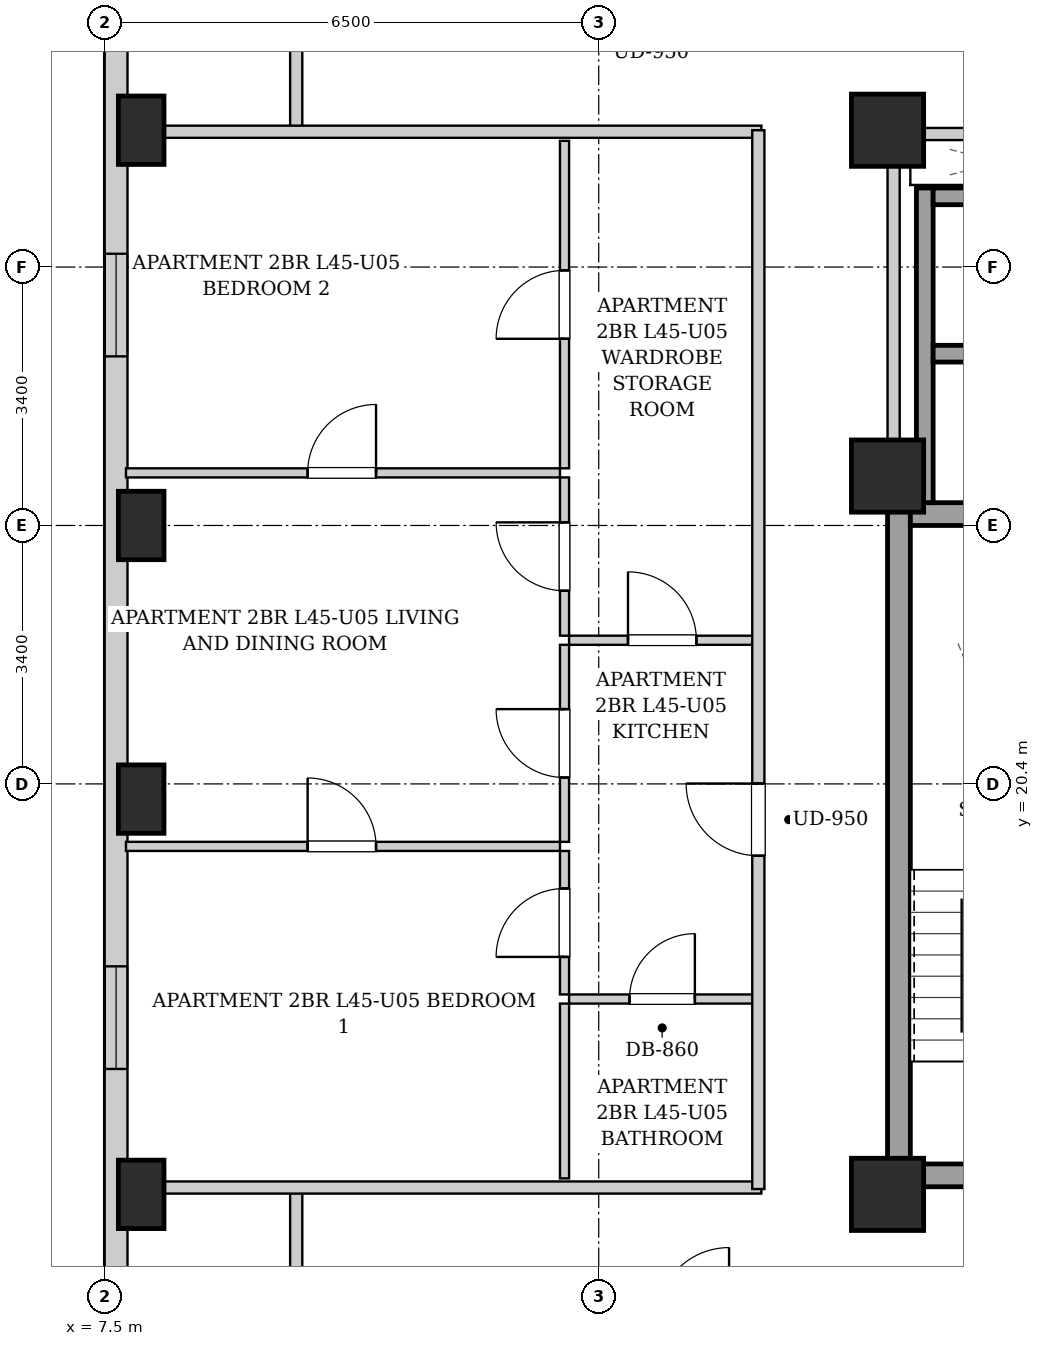
"""IFC4 building model, lengths in metres.
Left out: names, types, materials, properties, quantities, classifications, styles, units other than length and angle.
Written with IfcOpenShell. Run it as: python <this file> out.ifc"""

import sys

from ifc_helpers import new_model, si_unit, direction, frame, frame_2d, origin, origin_2d, place, context, subcontext, project, spatial, rectangle, extrude, element, fill, save


model = new_model("IFC4")
c1 = context("Model", 3, precision=1e-05, world=origin(), true_north=direction((0.0, 1.0)))
c2 = subcontext(c1, "Body", "Model", "MODEL_VIEW")
j1 = project(units=[si_unit("LENGTHUNIT", "METRE"), si_unit("PLANEANGLEUNIT", "RADIAN")], contexts=[c1])
p1 = place(None, origin())
s1 = spatial("IfcSite", under=j1, at=p1, CompositionType="ELEMENT")
p2 = place(p1, origin())
s2 = spatial("IfcBuilding", under=s1, at=p2, CompositionType="ELEMENT")
p3 = place(p2, frame((0.0, 0.0, 156.9)))
s3 = spatial("IfcBuildingStorey", under=s2, at=p3, CompositionType="ELEMENT", Elevation=156.9)
for number, where, z_axis, x_axis in (
    (1, (7.98, 15.0, 0.0), (0.0, 0.0, 1.0), (1.0, 0.0, 0.0)),
    (2, (7.98, 20.2, 0.0), (0.0, 0.0, 1.0), (1.0, 0.0, 0.0)),
    (3, (7.98, 23.8, 0.0), (0.0, 0.0, 1.0), (1.0, 0.0, 0.0)),
    (4, (7.98, 29.0, 0.0), (0.0, 0.0, 1.0), (1.0, 0.0, 0.0)),
):
    element("IfcColumn", number, at=place(p3, frame(where, z_axis=z_axis, x_axis=x_axis)), inside=s3, PredefinedType="COLUMN", context=c2, shape_type="SweptSolid", body=[
        extrude(rectangle(XDim=0.6, YDim=0.9, at=origin_2d()), origin(), (0.0, 0.0, 1.0), 3.25),
    ])
for number, where, z_axis, x_axis in (
    (5, (17.8, 15.0, 0.0), (0.0, 0.0, 1.0), (1.0, 0.0, 0.0)),
    (6, (17.8, 29.0, 0.0), (0.0, 0.0, 1.0), (1.0, 0.0, 0.0)),
    (7, (17.8, 24.45, 0.0), (0.0, 0.0, 1.0), (1.0, 0.0, 0.0)),
):
    element("IfcColumn", number, at=place(p3, frame(where, z_axis=z_axis, x_axis=x_axis)), inside=s3, PredefinedType="COLUMN", context=c2, shape_type="SweptSolid", body=[
        extrude(rectangle(XDim=0.95, YDim=0.95, at=origin_2d()), origin(), (0.0, 0.0, 1.0), 3.25),
    ])
p4 = place(p3, frame((7.65, 6.3, 0.0), z_axis=(0.0, 0.0, 1.0), x_axis=(0.0, 1.0, 0.0)))
e8 = element("IfcWall", 8, at=p4, inside=s3, PredefinedType="SOLIDWALL", context=c2, shape_type="SweptSolid", body=[
    extrude(rectangle(XDim=34.5, YDim=0.3, at=frame_2d((17.25, 0.0))), origin(), (0.0, 0.0, 1.0), 2.99),
])
p5 = place(p4, frame((30.075, 0.0, 0.55)))
e9 = element("IfcOpeningElement", 9, at=p5, cuts=e8, PredefinedType="OPENING", context=c2, shape_type="SweptSolid", body=[
    extrude(rectangle(XDim=1.35, YDim=1.2, at=frame_2d((0.675, 0.6))), frame((0.0, 0.16, 0.0), z_axis=(0.0, -1.0, 0.0), x_axis=(1.0, 0.0, 0.0)), (0.0, 0.0, 1.0), 0.32),
])
p6 = place(p4, frame((28.31, 0.0, 0.55)))
e10 = element("IfcOpeningElement", 10, at=p6, cuts=e8, PredefinedType="OPENING", context=c2, shape_type="SweptSolid", body=[
    extrude(rectangle(XDim=1.35, YDim=1.2, at=frame_2d((0.675, 0.6))), frame((0.0, 0.16, 0.0), z_axis=(0.0, -1.0, 0.0), x_axis=(1.0, 0.0, 0.0)), (0.0, 0.0, 1.0), 0.32),
])
p7 = place(p4, frame((10.35, 0.0, 0.55)))
e11 = element("IfcOpeningElement", 11, at=p7, cuts=e8, PredefinedType="OPENING", context=c2, shape_type="SweptSolid", body=[
    extrude(rectangle(XDim=1.35, YDim=1.2, at=frame_2d((0.675, 0.6))), frame((0.0, 0.16, 0.0), z_axis=(0.0, -1.0, 0.0), x_axis=(1.0, 0.0, 0.0)), (0.0, 0.0, 1.0), 0.32),
])
p8 = place(p4, frame((19.725, 0.0, 0.55)))
e12 = element("IfcOpeningElement", 12, at=p8, cuts=e8, PredefinedType="OPENING", context=c2, shape_type="SweptSolid", body=[
    extrude(rectangle(XDim=1.35, YDim=1.2, at=frame_2d((0.675, 0.6))), frame((0.0, 0.16, 0.0), z_axis=(0.0, -1.0, 0.0), x_axis=(1.0, 0.0, 0.0)), (0.0, 0.0, 1.0), 0.32),
])
p9 = place(p3, frame((17.95, 15.1, 0.0), z_axis=(0.0, 0.0, 1.0), x_axis=(0.0, 1.0, 0.0)))
e13 = element("IfcWall", 13, at=p9, inside=s3, PredefinedType="SHEAR", context=c2, shape_type="SweptSolid", body=[
    extrude(rectangle(XDim=9.0, YDim=0.3, at=frame_2d((4.5, 0.0))), origin(), (0.0, 0.0, 1.0), 2.99),
])
p10 = place(p3, frame((18.1, 23.95, 0.0), z_axis=(0.0, 0.0, 1.0), x_axis=(1.0, 0.0, 0.0)))
e14 = element("IfcWall", 14, at=p10, inside=s3, PredefinedType="SHEAR", context=c2, shape_type="SweptSolid", body=[
    extrude(rectangle(XDim=2.85, YDim=0.3, at=frame_2d((1.425, 0.0))), origin(), (0.0, 0.0, 1.0), 2.99),
])
p11 = place(p3, frame((18.1, 15.25, 0.0), z_axis=(0.0, 0.0, 1.0), x_axis=(1.0, 0.0, 0.0)))
e15 = element("IfcWall", 15, at=p11, inside=s3, PredefinedType="SHEAR", context=c2, shape_type="SweptSolid", body=[
    extrude(rectangle(XDim=2.85, YDim=0.3, at=frame_2d((1.425, 0.0))), origin(), (0.0, 0.0, 1.0), 2.99),
])
p12 = place(p11, frame((0.86, 0.0, 0.0)))
e16 = element("IfcOpeningElement", 16, at=p12, cuts=e15, PredefinedType="OPENING", context=c2, shape_type="SweptSolid", body=[
    extrude(rectangle(XDim=1.1, YDim=2.05, at=frame_2d((0.55, 1.025))), frame((0.0, 0.16, 0.0), z_axis=(0.0, -1.0, 0.0), x_axis=(1.0, 0.0, 0.0)), (0.0, 0.0, 1.0), 0.32),
])
p13 = place(p3, frame((18.29, 24.1, 0.0), z_axis=(0.0, 0.0, 1.0), x_axis=(0.0, 1.0, 0.0)))
e17 = element("IfcWall", 17, at=p13, inside=s3, PredefinedType="SHEAR", context=c2, shape_type="SweptSolid", body=[
    extrude(rectangle(XDim=4.14, YDim=0.22, at=frame_2d((2.07, 0.0))), origin(), (0.0, 0.0, 1.0), 2.99),
])
for number, where, z_axis, x_axis in (
    (18, (18.4, 26.06, 0.0), (0.0, 0.0, 1.0), (1.0, 0.0, 0.0)),
    (19, (18.4, 28.13, 0.0), (0.0, 0.0, 1.0), (1.0, 0.0, 0.0)),
):
    element("IfcWall", number, at=place(p3, frame(where, z_axis=z_axis, x_axis=x_axis)), inside=s3, PredefinedType="SHEAR", context=c2, shape_type="SweptSolid", body=[
        extrude(rectangle(XDim=1.9, YDim=0.22, at=frame_2d((0.95, 0.0))), origin(), (0.0, 0.0, 1.0), 2.99),
    ])
p14 = place(p3, frame((17.88, 24.12, 0.0), z_axis=(0.0, 0.0, 1.0), x_axis=(0.0, 1.0, 0.0)))
e20 = element("IfcWall", 20, at=p14, inside=s3, PredefinedType="PARTITIONING", context=c2, shape_type="SweptSolid", body=[
    extrude(rectangle(XDim=4.76, YDim=0.16, at=frame_2d((2.38, 0.0))), origin(), (0.0, 0.0, 1.0), 2.325),
])
p15 = place(p3, frame((17.96, 28.95, 0.0), z_axis=(0.0, 0.0, 1.0), x_axis=(1.0, 0.0, 0.0)))
e21 = element("IfcWall", 21, at=p15, inside=s3, PredefinedType="PARTITIONING", context=c2, shape_type="SweptSolid", body=[
    extrude(rectangle(XDim=4.29, YDim=0.16, at=frame_2d((2.145, 0.0))), origin(), (0.0, 0.0, 1.0), 2.442),
])
p16 = place(p15, frame((1.695, 0.0, 0.0)))
e22 = element("IfcOpeningElement", 22, at=p16, cuts=e21, PredefinedType="OPENING", context=c2, shape_type="SweptSolid", body=[
    extrude(rectangle(XDim=0.86, YDim=2.05, at=frame_2d((0.43, 1.025))), frame((0.0, 0.09, 0.0), z_axis=(0.0, -1.0, 0.0), x_axis=(1.0, 0.0, 0.0)), (0.0, 0.0, 1.0), 0.18),
])
for number, where, z_axis, x_axis in (
    (23, (10.02, 13.35, 0.0), (0.0, 0.0, 1.0), (0.0, 1.0, 0.0)),
    (24, (10.02, 28.98, 0.0), (0.0, 0.0, 1.0), (0.0, 1.0, 0.0)),
):
    element("IfcWall", number, at=place(p3, frame(where, z_axis=z_axis, x_axis=x_axis)), inside=s3, PredefinedType="PARTITIONING", context=c2, shape_type="SweptSolid", body=[
        extrude(rectangle(XDim=1.74, YDim=0.16, at=frame_2d((0.87, 0.0))), origin(), (0.0, 0.0, 1.0), 2.99),
    ])
for number, where, z_axis, x_axis in (
    (25, (7.78, 15.09, 0.0), (0.0, 0.0, 1.0), (1.0, 0.0, 0.0)),
    (26, (7.78, 28.98, 0.0), (0.0, 0.0, 1.0), (1.0, 0.0, 0.0)),
):
    element("IfcWall", number, at=place(p3, frame(where, z_axis=z_axis, x_axis=x_axis)), inside=s3, PredefinedType="PARTITIONING", context=c2, shape_type="SweptSolid", body=[
        extrude(rectangle(XDim=8.36, YDim=0.16, at=frame_2d((4.18, 0.0))), origin(), (0.0, 0.0, 1.0), 2.442),
    ])
p17 = place(p3, frame((13.61, 22.29, 0.0), z_axis=(0.0, 0.0, 1.0), x_axis=(1.0, 0.0, 0.0)))
e27 = element("IfcWall", 27, at=p17, inside=s3, PredefinedType="PARTITIONING", context=c2, shape_type="SweptSolid", body=[
    extrude(rectangle(XDim=2.45, YDim=0.12, at=frame_2d((1.225, 0.0))), origin(), (0.0, 0.0, 1.0), 2.99),
])
p18 = place(p17, frame((0.775, 0.0, 0.0)))
e28 = element("IfcOpeningElement", 28, at=p18, cuts=e27, PredefinedType="OPENING", context=c2, shape_type="SweptSolid", body=[
    extrude(rectangle(XDim=0.9, YDim=2.05, at=frame_2d((0.45, 1.025))), frame((0.0, 0.07, 0.0), z_axis=(0.0, -1.0, 0.0), x_axis=(1.0, 0.0, 0.0)), (0.0, 0.0, 1.0), 0.14),
])
p19 = place(p3, frame((13.55, 22.35, 0.0), z_axis=(0.0, 0.0, 1.0), x_axis=(0.0, 1.0, 0.0)))
e29 = element("IfcWall", 29, at=p19, inside=s3, PredefinedType="PARTITIONING", context=c2, shape_type="SweptSolid", body=[
    extrude(rectangle(XDim=2.082, YDim=0.12, at=frame_2d((1.041, 0.0))), origin(), (0.0, 0.0, 1.0), 2.99),
])
p20 = place(p19, frame((0.591, 0.0, 0.0)))
e30 = element("IfcOpeningElement", 30, at=p20, cuts=e29, PredefinedType="OPENING", context=c2, shape_type="SweptSolid", body=[
    extrude(rectangle(XDim=0.9, YDim=2.05, at=frame_2d((0.45, 1.025))), frame((0.0, 0.07, 0.0), z_axis=(0.0, -1.0, 0.0), x_axis=(1.0, 0.0, 0.0)), (0.0, 0.0, 1.0), 0.14),
])
p21 = place(p3, frame((13.55, 24.552, 0.0), z_axis=(0.0, 0.0, 1.0), x_axis=(0.0, 1.0, 0.0)))
e31 = element("IfcWall", 31, at=p21, inside=s3, PredefinedType="PARTITIONING", context=c2, shape_type="SweptSolid", body=[
    extrude(rectangle(XDim=4.308, YDim=0.12, at=frame_2d((2.154, 0.0))), origin(), (0.0, 0.0, 1.0), 2.99),
])
p22 = place(p21, frame((1.704, 0.0, 0.0)))
e32 = element("IfcOpeningElement", 32, at=p22, cuts=e31, PredefinedType="OPENING", context=c2, shape_type="SweptSolid", body=[
    extrude(rectangle(XDim=0.9, YDim=2.05, at=frame_2d((0.45, 1.025))), frame((0.0, 0.07, 0.0), z_axis=(0.0, -1.0, 0.0), x_axis=(1.0, 0.0, 0.0)), (0.0, 0.0, 1.0), 0.14),
])
p23 = place(p3, frame((13.61, 17.57, 0.0), z_axis=(0.0, 0.0, 1.0), x_axis=(1.0, 0.0, 0.0)))
e33 = element("IfcWall", 33, at=p23, inside=s3, PredefinedType="PARTITIONING", context=c2, shape_type="SweptSolid", body=[
    extrude(rectangle(XDim=2.45, YDim=0.12, at=frame_2d((1.225, 0.0))), origin(), (0.0, 0.0, 1.0), 2.99),
])
p24 = place(p23, frame((0.795, 0.0, 0.0)))
e34 = element("IfcOpeningElement", 34, at=p24, cuts=e33, PredefinedType="OPENING", context=c2, shape_type="SweptSolid", body=[
    extrude(rectangle(XDim=0.86, YDim=2.05, at=frame_2d((0.43, 1.025))), frame((0.0, 0.07, 0.0), z_axis=(0.0, -1.0, 0.0), x_axis=(1.0, 0.0, 0.0)), (0.0, 0.0, 1.0), 0.14),
])
p25 = place(p3, frame((13.55, 15.21, 0.0), z_axis=(0.0, 0.0, 1.0), x_axis=(0.0, 1.0, 0.0)))
e35 = element("IfcWall", 35, at=p25, inside=s3, PredefinedType="PARTITIONING", context=c2, shape_type="SweptSolid", body=[
    extrude(rectangle(XDim=2.3, YDim=0.12, at=frame_2d((1.15, 0.0))), origin(), (0.0, 0.0, 1.0), 2.99),
])
p26 = place(p3, frame((13.55, 17.63, 0.0), z_axis=(0.0, 0.0, 1.0), x_axis=(0.0, 1.0, 0.0)))
e36 = element("IfcWall", 36, at=p26, inside=s3, PredefinedType="PARTITIONING", context=c2, shape_type="SweptSolid", body=[
    extrude(rectangle(XDim=1.888, YDim=0.12, at=frame_2d((0.944, 0.0))), origin(), (0.0, 0.0, 1.0), 2.99),
])
p27 = place(p26, frame((0.494, 0.0, 0.0)))
e37 = element("IfcOpeningElement", 37, at=p27, cuts=e36, PredefinedType="OPENING", context=c2, shape_type="SweptSolid", body=[
    extrude(rectangle(XDim=0.9, YDim=2.05, at=frame_2d((0.45, 1.025))), frame((0.0, 0.07, 0.0), z_axis=(0.0, -1.0, 0.0), x_axis=(1.0, 0.0, 0.0)), (0.0, 0.0, 1.0), 0.14),
])
p28 = place(p3, frame((13.55, 19.638, 0.0), z_axis=(0.0, 0.0, 1.0), x_axis=(0.0, 1.0, 0.0)))
e38 = element("IfcWall", 38, at=p28, inside=s3, PredefinedType="PARTITIONING", context=c2, shape_type="SweptSolid", body=[
    extrude(rectangle(XDim=2.592, YDim=0.12, at=frame_2d((1.296, 0.0))), origin(), (0.0, 0.0, 1.0), 2.99),
])
p29 = place(p28, frame((0.846, 0.0, 0.0)))
e39 = element("IfcOpeningElement", 39, at=p29, cuts=e38, PredefinedType="OPENING", context=c2, shape_type="SweptSolid", body=[
    extrude(rectangle(XDim=0.9, YDim=2.05, at=frame_2d((0.45, 1.025))), frame((0.0, 0.07, 0.0), z_axis=(0.0, -1.0, 0.0), x_axis=(1.0, 0.0, 0.0)), (0.0, 0.0, 1.0), 0.14),
])
p30 = place(p3, frame((7.78, 19.578, 0.0), z_axis=(0.0, 0.0, 1.0), x_axis=(1.0, 0.0, 0.0)))
e40 = element("IfcWall", 40, at=p30, inside=s3, PredefinedType="PARTITIONING", context=c2, shape_type="SweptSolid", body=[
    extrude(rectangle(XDim=5.71, YDim=0.12, at=frame_2d((2.855, 0.0))), origin(), (0.0, 0.0, 1.0), 2.99),
])
p31 = place(p30, frame((2.39, 0.0, 0.0)))
e41 = element("IfcOpeningElement", 41, at=p31, cuts=e40, PredefinedType="OPENING", context=c2, shape_type="SweptSolid", body=[
    extrude(rectangle(XDim=0.9, YDim=2.05, at=frame_2d((0.45, 1.025))), frame((0.0, 0.07, 0.0), z_axis=(0.0, -1.0, 0.0), x_axis=(1.0, 0.0, 0.0)), (0.0, 0.0, 1.0), 0.14),
])
p32 = place(p3, frame((7.78, 24.492, 0.0), z_axis=(0.0, 0.0, 1.0), x_axis=(1.0, 0.0, 0.0)))
e42 = element("IfcWall", 42, at=p32, inside=s3, PredefinedType="PARTITIONING", context=c2, shape_type="SweptSolid", body=[
    extrude(rectangle(XDim=5.71, YDim=0.12, at=frame_2d((2.855, 0.0))), origin(), (0.0, 0.0, 1.0), 2.621),
])
p33 = place(p32, frame((2.39, 0.0, 0.0)))
e43 = element("IfcOpeningElement", 43, at=p33, cuts=e42, PredefinedType="OPENING", context=c2, shape_type="SweptSolid", body=[
    extrude(rectangle(XDim=0.9, YDim=2.05, at=frame_2d((0.45, 1.025))), frame((0.0, 0.07, 0.0), z_axis=(0.0, -1.0, 0.0), x_axis=(1.0, 0.0, 0.0)), (0.0, 0.0, 1.0), 0.14),
])
p34 = place(p3, frame((16.1, 15.07, 0.0), z_axis=(0.0, 0.0, 1.0), x_axis=(0.0, 1.0, 0.0)))
e44 = element("IfcWall", 44, at=p34, inside=s3, PredefinedType="PARTITIONING", context=c2, shape_type="SweptSolid", body=[
    extrude(rectangle(XDim=13.93, YDim=0.16, at=frame_2d((6.965, 0.0))), origin(), (0.0, 0.0, 1.0), 2.99),
])
p35 = place(p34, frame((4.385, 0.0, 0.0)))
e45 = element("IfcOpeningElement", 45, at=p35, cuts=e44, PredefinedType="OPENING", context=c2, shape_type="SweptSolid", body=[
    extrude(rectangle(XDim=0.95, YDim=2.1, at=frame_2d((0.475, 1.05))), frame((0.0, 0.09, 0.0), z_axis=(0.0, -1.0, 0.0), x_axis=(1.0, 0.0, 0.0)), (0.0, 0.0, 1.0), 0.18),
])
p36 = place(p18, origin())
e46 = element("IfcDoor", 46, at=p36, inside=s3, OperationType="SINGLE_SWING_LEFT", PredefinedType="DOOR", context=c2, shape_type="SweptSolid", body=[
    extrude(rectangle(XDim=0.9, YDim=2.05, at=frame_2d((0.45, 1.025))), frame((0.0, 0.025, 0.0), z_axis=(0.0, -1.0, 0.0), x_axis=(1.0, 0.0, 0.0)), (0.0, 0.0, 1.0), 0.05),
])
fill(e28, e46)
p37 = place(p20, origin())
e47 = element("IfcDoor", 47, at=p37, inside=s3, OperationType="SINGLE_SWING_RIGHT", PredefinedType="DOOR", context=c2, shape_type="SweptSolid", body=[
    extrude(rectangle(XDim=0.9, YDim=2.05, at=frame_2d((0.45, 1.025))), frame((0.0, 0.025, 0.0), z_axis=(0.0, -1.0, 0.0), x_axis=(1.0, 0.0, 0.0)), (0.0, 0.0, 1.0), 0.05),
])
fill(e30, e47)
p38 = place(p22, origin())
e48 = element("IfcDoor", 48, at=p38, inside=s3, OperationType="SINGLE_SWING_LEFT", PredefinedType="DOOR", context=c2, shape_type="SweptSolid", body=[
    extrude(rectangle(XDim=0.9, YDim=2.05, at=frame_2d((0.45, 1.025))), frame((0.0, 0.025, 0.0), z_axis=(0.0, -1.0, 0.0), x_axis=(1.0, 0.0, 0.0)), (0.0, 0.0, 1.0), 0.05),
])
fill(e32, e48)
p39 = place(p24, origin())
e49 = element("IfcDoor", 49, at=p39, inside=s3, OperationType="SINGLE_SWING_RIGHT", PredefinedType="DOOR", context=c2, shape_type="SweptSolid", body=[
    extrude(rectangle(XDim=0.86, YDim=2.05, at=frame_2d((0.43, 1.025))), frame((0.0, 0.025, 0.0), z_axis=(0.0, -1.0, 0.0), x_axis=(1.0, 0.0, 0.0)), (0.0, 0.0, 1.0), 0.05),
])
fill(e34, e49)
p40 = place(p27, origin())
e50 = element("IfcDoor", 50, at=p40, inside=s3, OperationType="SINGLE_SWING_LEFT", PredefinedType="DOOR", context=c2, shape_type="SweptSolid", body=[
    extrude(rectangle(XDim=0.9, YDim=2.05, at=frame_2d((0.45, 1.025))), frame((0.0, 0.025, 0.0), z_axis=(0.0, -1.0, 0.0), x_axis=(1.0, 0.0, 0.0)), (0.0, 0.0, 1.0), 0.05),
])
fill(e37, e50)
p41 = place(p29, origin())
e51 = element("IfcDoor", 51, at=p41, inside=s3, OperationType="SINGLE_SWING_RIGHT", PredefinedType="DOOR", context=c2, shape_type="SweptSolid", body=[
    extrude(rectangle(XDim=0.9, YDim=2.05, at=frame_2d((0.45, 1.025))), frame((0.0, 0.025, 0.0), z_axis=(0.0, -1.0, 0.0), x_axis=(1.0, 0.0, 0.0)), (0.0, 0.0, 1.0), 0.05),
])
fill(e39, e51)
p42 = place(p31, origin())
e52 = element("IfcDoor", 52, at=p42, inside=s3, OperationType="SINGLE_SWING_LEFT", PredefinedType="DOOR", context=c2, shape_type="SweptSolid", body=[
    extrude(rectangle(XDim=0.9, YDim=2.05, at=frame_2d((0.45, 1.025))), frame((0.0, 0.025, 0.0), z_axis=(0.0, -1.0, 0.0), x_axis=(1.0, 0.0, 0.0)), (0.0, 0.0, 1.0), 0.05),
])
fill(e41, e52)
p43 = place(p33, origin())
e53 = element("IfcDoor", 53, at=p43, inside=s3, OperationType="SINGLE_SWING_RIGHT", PredefinedType="DOOR", context=c2, shape_type="SweptSolid", body=[
    extrude(rectangle(XDim=0.9, YDim=2.05, at=frame_2d((0.45, 1.025))), frame((0.0, 0.025, 0.0), z_axis=(0.0, -1.0, 0.0), x_axis=(1.0, 0.0, 0.0)), (0.0, 0.0, 1.0), 0.05),
])
fill(e43, e53)
p44 = place(p35, origin())
e54 = element("IfcDoor", 54, at=p44, inside=s3, OperationType="SINGLE_SWING_RIGHT", PredefinedType="DOOR", context=c2, shape_type="SweptSolid", body=[
    extrude(rectangle(XDim=0.95, YDim=2.1, at=frame_2d((0.475, 1.05))), frame((0.0, 0.025, 0.0), z_axis=(0.0, -1.0, 0.0), x_axis=(1.0, 0.0, 0.0)), (0.0, 0.0, 1.0), 0.05),
])
fill(e45, e54)
p45 = place(p7, origin())
e55 = element("IfcWindow", 55, at=p45, inside=s3, PartitioningType="SINGLE_PANEL", PredefinedType="WINDOW", context=c2, shape_type="SweptSolid", body=[
    extrude(rectangle(XDim=1.35, YDim=1.2, at=frame_2d((0.675, 0.6))), frame((0.0, 0.03, 0.0), z_axis=(0.0, -1.0, 0.0), x_axis=(1.0, 0.0, 0.0)), (0.0, 0.0, 1.0), 0.06),
])
fill(e11, e55)
p46 = place(p8, origin())
e56 = element("IfcWindow", 56, at=p46, inside=s3, PartitioningType="SINGLE_PANEL", PredefinedType="WINDOW", context=c2, shape_type="SweptSolid", body=[
    extrude(rectangle(XDim=1.35, YDim=1.2, at=frame_2d((0.675, 0.6))), frame((0.0, 0.03, 0.0), z_axis=(0.0, -1.0, 0.0), x_axis=(1.0, 0.0, 0.0)), (0.0, 0.0, 1.0), 0.06),
])
fill(e12, e56)
save(model, sys.argv[1])
